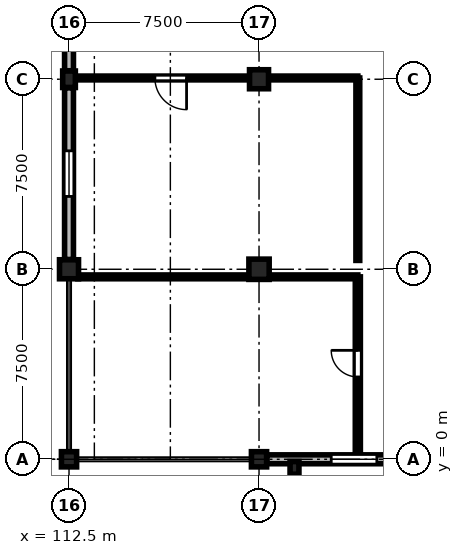
"""IFC4 building model, lengths in metres.
Left out: names, types, materials, properties, quantities, classifications, styles, units other than length and angle.
Written with IfcOpenShell. Run it as: python <this file> out.ifc"""

import sys

from ifc_helpers import new_model, si_unit, direction, frame, frame_2d, origin, origin_2d, place, context, subcontext, project, spatial, rectangle, circle, extrude, element, fill, save


model = new_model("IFC4")
c1 = context("Model", 3, precision=1e-05, world=origin(), true_north=direction((0.0, 1.0)))
c2 = subcontext(c1, "Body", "Model", "MODEL_VIEW")
j1 = project(units=[si_unit("LENGTHUNIT", "METRE"), si_unit("PLANEANGLEUNIT", "RADIAN")], contexts=[c1])
p1 = place(None, origin())
s1 = spatial("IfcSite", under=j1, at=p1, CompositionType="ELEMENT")
p2 = place(p1, origin())
s2 = spatial("IfcBuilding", under=s1, at=p2, CompositionType="ELEMENT")
p3 = place(p2, origin())
s3 = spatial("IfcBuildingStorey", under=s2, at=p3, CompositionType="ELEMENT", Elevation=0.0)
p4 = place(p3, frame((112.5, 0.0, 0.0), z_axis=(0.0, 0.0, 1.0), x_axis=(1.0, 0.0, 0.0)))
e1 = element("IfcColumn", 1, at=p4, inside=s3, PredefinedType="COLUMN", context=c2, shape_type="SweptSolid", body=[
    extrude(circle(Radius=0.3, at=origin_2d()), origin(), (0.0, 0.0, 1.0), 4.8),
])
p5 = place(p3, frame((112.5, 7.5, 0.0), z_axis=(0.0, 0.0, 1.0), x_axis=(1.0, 0.0, 0.0)))
e2 = element("IfcColumn", 2, at=p5, inside=s3, PredefinedType="COLUMN", context=c2, shape_type="SweptSolid", body=[
    extrude(rectangle(XDim=0.75, YDim=0.75, at=origin_2d()), origin(), (0.0, 0.0, 1.0), 4.8),
])
p6 = place(p3, frame((112.5, 15.0, 0.0), z_axis=(0.0, 0.0, 1.0), x_axis=(1.0, 0.0, 0.0)))
e3 = element("IfcColumn", 3, at=p6, inside=s3, PredefinedType="COLUMN", context=c2, shape_type="SweptSolid", body=[
    extrude(rectangle(XDim=0.5, YDim=0.65, at=origin_2d()), origin(), (0.0, 0.0, 1.0), 4.8),
])
p7 = place(p3, frame((120.0, 0.0, 0.0), z_axis=(0.0, 0.0, 1.0), x_axis=(1.0, 0.0, 0.0)))
e4 = element("IfcColumn", 4, at=p7, inside=s3, PredefinedType="COLUMN", context=c2, shape_type="SweptSolid", body=[
    extrude(rectangle(XDim=0.6, YDim=0.6, at=origin_2d()), origin(), (0.0, 0.0, 1.0), 4.8),
])
p8 = place(p3, frame((120.0, 7.5, 0.0), z_axis=(0.0, 0.0, 1.0), x_axis=(1.0, 0.0, 0.0)))
e5 = element("IfcColumn", 5, at=p8, inside=s3, PredefinedType="COLUMN", context=c2, shape_type="SweptSolid", body=[
    extrude(rectangle(XDim=0.8, YDim=0.8, at=origin_2d()), origin(), (0.0, 0.0, 1.0), 4.8),
])
p9 = place(p3, frame((120.0, 15.0, 0.0), z_axis=(0.0, 0.0, 1.0), x_axis=(1.0, 0.0, 0.0)))
e6 = element("IfcColumn", 6, at=p9, inside=s3, PredefinedType="COLUMN", context=c2, shape_type="SweptSolid", body=[
    extrude(circle(Radius=0.375, at=origin_2d()), origin(), (0.0, 0.0, 1.0), 4.8),
])
p10 = place(p3, frame((121.4, -0.34, 0.0), z_axis=(0.0, 0.0, 1.0), x_axis=(1.0, 0.0, 0.0)))
e7 = element("IfcColumn", 7, at=p10, inside=s3, PredefinedType="PILASTER", context=c2, shape_type="SweptSolid", body=[
    extrude(rectangle(XDim=0.35, YDim=0.5, at=origin_2d()), origin(), (0.0, 0.0, 1.0), 4.1),
])
p11 = place(p3, frame((112.5, 7.885, 0.0), z_axis=(0.0, 0.0, 1.0), x_axis=(0.0, 1.0, 0.0)))
e8 = element("IfcWall", 8, at=p11, inside=s3, PredefinedType="STANDARD", context=c2, shape_type="SweptSolid", body=[
    extrude(rectangle(XDim=6.78, YDim=0.35, at=frame_2d((3.39, 0.0))), origin(), (0.0, 0.0, 1.0), 3.9),
])
p12 = place(p11, frame((2.49, 0.0, 0.9)))
e9 = element("IfcOpeningElement", 9, at=p12, cuts=e8, PredefinedType="OPENING", context=c2, shape_type="SweptSolid", body=[
    extrude(rectangle(XDim=1.8, YDim=2.4, at=frame_2d((0.9, 1.2))), frame((0.0, 0.185, 0.0), z_axis=(0.0, -1.0, 0.0), x_axis=(1.0, 0.0, 0.0)), (0.0, 0.0, 1.0), 0.37),
])
p13 = place(p3, frame((112.5, 15.335, 0.0), z_axis=(0.0, 0.0, 1.0), x_axis=(0.0, 1.0, 0.0)))
e10 = element("IfcWall", 10, at=p13, inside=s3, PredefinedType="STANDARD", context=c2, shape_type="SweptSolid", body=[
    extrude(rectangle(XDim=6.995, YDim=0.35, at=frame_2d((3.498, 0.0))), origin(), (0.0, 0.0, 1.0), 3.9),
])
p14 = place(p13, frame((2.748, 0.0, 0.9)))
e11 = element("IfcOpeningElement", 11, at=p14, cuts=e10, PredefinedType="OPENING", context=c2, shape_type="SweptSolid", body=[
    extrude(rectangle(XDim=1.5, YDim=2.4, at=frame_2d((0.75, 1.2))), frame((0.0, 0.185, 0.0), z_axis=(0.0, -1.0, 0.0), x_axis=(1.0, 0.0, 0.0)), (0.0, 0.0, 1.0), 0.37),
])
p15 = place(p3, frame((127.19, 0.0, 0.0), z_axis=(0.0, 0.0, 1.0), x_axis=(-1.0, 0.0, 0.0)))
e12 = element("IfcWall", 12, at=p15, inside=s3, PredefinedType="STANDARD", context=c2, shape_type="SweptSolid", body=[
    extrude(rectangle(XDim=6.88, YDim=0.35, at=frame_2d((3.44, 0.0))), origin(), (0.0, 0.0, 1.0), 3.95),
])
p16 = place(p15, frame((2.54, 0.0, 0.9)))
e13 = element("IfcOpeningElement", 13, at=p16, cuts=e12, PredefinedType="OPENING", context=c2, shape_type="SweptSolid", body=[
    extrude(rectangle(XDim=1.8, YDim=2.4, at=frame_2d((0.9, 1.2))), frame((0.0, 0.185, 0.0), z_axis=(0.0, -1.0, 0.0), x_axis=(1.0, 0.0, 0.0)), (0.0, 0.0, 1.0), 0.37),
])
p17 = place(p3, frame((123.9, 0.35, 0.0), z_axis=(0.0, 0.0, 1.0), x_axis=(0.0, 1.0, 0.0)))
e14 = element("IfcWall", 14, at=p17, inside=s3, PredefinedType="STANDARD", context=c2, shape_type="SweptSolid", body=[
    extrude(rectangle(XDim=6.85, YDim=0.2, at=frame_2d((3.425, 0.0))), origin(), (0.0, 0.0, 1.0), 4.485),
])
p18 = place(p17, frame((2.9, 0.0, 0.0)))
e15 = element("IfcOpeningElement", 15, at=p18, cuts=e14, PredefinedType="OPENING", context=c2, shape_type="SweptSolid", body=[
    extrude(rectangle(XDim=1.05, YDim=2.2, at=frame_2d((0.525, 1.1))), frame((0.0, 0.11, 0.0), z_axis=(0.0, -1.0, 0.0), x_axis=(1.0, 0.0, 0.0)), (0.0, 0.0, 1.0), 0.22),
])
p19 = place(p3, frame((123.9, 15.05, 0.0), z_axis=(0.0, 0.0, 1.0), x_axis=(-1.0, 0.0, 0.0)))
e16 = element("IfcWall", 16, at=p19, inside=s3, PredefinedType="PARTITIONING", context=c2, shape_type="SweptSolid", body=[
    extrude(rectangle(XDim=11.05, YDim=0.15, at=frame_2d((5.525, 0.0))), origin(), (0.0, 0.0, 1.0), 3.835),
])
p20 = place(p19, frame((6.76, 0.0, 0.0)))
e17 = element("IfcOpeningElement", 17, at=p20, cuts=e16, PredefinedType="OPENING", context=c2, shape_type="SweptSolid", body=[
    extrude(rectangle(XDim=1.25, YDim=2.2, at=frame_2d((0.625, 1.1))), frame((0.0, 0.085, 0.0), z_axis=(0.0, -1.0, 0.0), x_axis=(1.0, 0.0, 0.0)), (0.0, 0.0, 1.0), 0.17),
])
p21 = place(p3, frame((112.85, 7.2, 0.0), z_axis=(0.0, 0.0, 1.0), x_axis=(1.0, 0.0, 0.0)))
e18 = element("IfcWall", 18, at=p21, inside=s3, PredefinedType="PARTITIONING", context=c2, shape_type="SweptSolid", body=[
    extrude(rectangle(XDim=11.05, YDim=0.15, at=frame_2d((5.525, 0.0))), origin(), (0.0, 0.0, 1.0), 3.835),
])
p22 = place(p3, frame((123.9, 7.85, 0.0), z_axis=(0.0, 0.0, 1.0), x_axis=(0.0, 1.0, 0.0)))
e19 = element("IfcWall", 19, at=p22, inside=s3, PredefinedType="PARTITIONING", context=c2, shape_type="SweptSolid", body=[
    extrude(rectangle(XDim=7.2, YDim=0.15, at=frame_2d((3.6, 0.0))), origin(), (0.0, 0.0, 1.0), 4.485),
])
p23 = place(p12, origin())
e20 = element("IfcWindow", 20, at=p23, inside=s3, PartitioningType="SINGLE_PANEL", PredefinedType="WINDOW", context=c2, shape_type="SweptSolid", body=[
    extrude(rectangle(XDim=1.8, YDim=2.4, at=frame_2d((0.9, 1.2))), frame((0.0, 0.03, 0.0), z_axis=(0.0, -1.0, 0.0), x_axis=(1.0, 0.0, 0.0)), (0.0, 0.0, 1.0), 0.06),
])
fill(e9, e20)
p24 = place(p16, origin())
e21 = element("IfcWindow", 21, at=p24, inside=s3, PartitioningType="SINGLE_PANEL", PredefinedType="WINDOW", context=c2, shape_type="SweptSolid", body=[
    extrude(rectangle(XDim=1.8, YDim=2.4, at=frame_2d((0.9, 1.2))), frame((0.0, 0.03, 0.0), z_axis=(0.0, -1.0, 0.0), x_axis=(1.0, 0.0, 0.0)), (0.0, 0.0, 1.0), 0.06),
])
fill(e13, e21)
p25 = place(p18, origin())
e22 = element("IfcDoor", 22, at=p25, inside=s3, OperationType="SINGLE_SWING_RIGHT", PredefinedType="DOOR", context=c2, shape_type="SweptSolid", body=[
    extrude(rectangle(XDim=1.05, YDim=2.2, at=frame_2d((0.525, 1.1))), frame((0.0, 0.025, 0.0), z_axis=(0.0, -1.0, 0.0), x_axis=(1.0, 0.0, 0.0)), (0.0, 0.0, 1.0), 0.05),
])
fill(e15, e22)
p26 = place(p20, origin())
e23 = element("IfcDoor", 23, at=p26, inside=s3, OperationType="SINGLE_SWING_LEFT", PredefinedType="DOOR", context=c2, shape_type="SweptSolid", body=[
    extrude(rectangle(XDim=1.25, YDim=2.2, at=frame_2d((0.625, 1.1))), frame((0.0, 0.025, 0.0), z_axis=(0.0, -1.0, 0.0), x_axis=(1.0, 0.0, 0.0)), (0.0, 0.0, 1.0), 0.05),
])
fill(e17, e23)
save(model, sys.argv[1])
